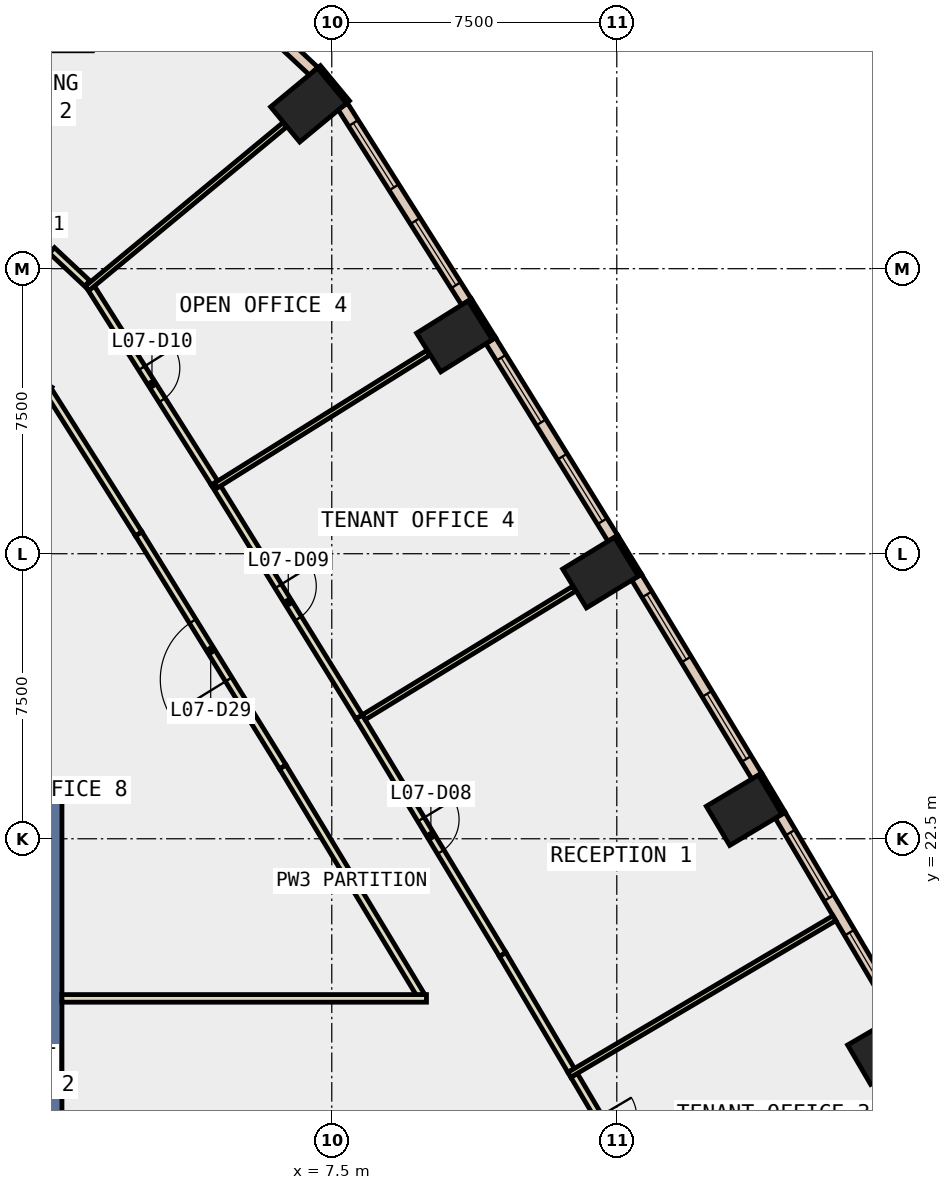
"""IFC4 building model, lengths in metres.
Left out: names, types, materials, properties, quantities, classifications, styles, units other than length and angle.
Written with IfcOpenShell. Run it as: python <this file> out.ifc"""

import sys

from ifc_helpers import new_model, si_unit, direction, frame, frame_2d, origin, origin_2d, place, context, subcontext, project, spatial, rectangle, extrude, element, fill, save


model = new_model("IFC4")
c1 = context("Model", 3, precision=1e-05, world=origin(), true_north=direction((0.0, 1.0)))
c2 = subcontext(c1, "Body", "Model", "MODEL_VIEW")
j1 = project(units=[si_unit("LENGTHUNIT", "METRE"), si_unit("PLANEANGLEUNIT", "RADIAN")], contexts=[c1])
p1 = place(None, origin())
s1 = spatial("IfcSite", under=j1, at=p1, CompositionType="ELEMENT")
p2 = place(p1, origin())
s2 = spatial("IfcBuilding", under=s1, at=p2, CompositionType="ELEMENT")
p3 = place(p2, frame((0.0, 0.0, 39.2)))
s3 = spatial("IfcBuildingStorey", under=s2, at=p3, CompositionType="ELEMENT", Elevation=39.2)
for number, where, z_axis, x_axis in (
    (1, (22.068, 16.959, -0.4), (0.0, 0.0, 1.0), (-0.504, 0.864, 0.0)),
    (2, (18.35, 23.25, -0.4), (0.0, 0.0, 1.0), (-0.513, 0.858, 0.0)),
    (3, (14.571, 29.504, -0.4), (0.0, 0.0, 1.0), (-0.522, 0.853, 0.0)),
    (4, (10.729, 35.719, -0.4), (0.0, 0.0, 1.0), (-0.53, 0.848, 0.0)),
    (5, (6.89, 41.806, -0.4), (0.0, 0.0, 1.0), (-0.638, 0.77, 0.0)),
):
    element("IfcColumn", number, at=place(p3, frame(where, z_axis=z_axis, x_axis=x_axis)), inside=s3, PredefinedType="COLUMN", context=c2, shape_type="SweptSolid", body=[
        extrude(rectangle(XDim=1.2, YDim=1.6, at=origin_2d()), origin(), (0.0, 0.0, 1.0), 4.2),
    ])
p4 = place(p3, frame((0.0, 14.5, -0.4), z_axis=(0.0, 0.0, 1.0), x_axis=(0.0, 1.0, 0.0)))
e6 = element("IfcWall", 6, at=p4, inside=s3, PredefinedType="SHEAR", context=c2, shape_type="SweptSolid", body=[
    extrude(rectangle(XDim=9.0, YDim=0.8, at=frame_2d((4.5, 0.0))), origin(), (0.0, 0.0, 1.0), 4.2),
])
for number, where, z_axis, x_axis in (
    (7, (19.388, 23.171, 0.0), (0.0, 0.0, 1.0), (-0.513, 0.858, 0.0)),
    (8, (15.609, 29.435, 0.0), (0.0, 0.0, 1.0), (-0.522, 0.853, 0.0)),
):
    element("IfcWall", number, at=place(p3, frame(where, z_axis=z_axis, x_axis=x_axis)), inside=s3, PredefinedType="STANDARD", context=c2, shape_type="SweptSolid", body=[
        extrude(rectangle(XDim=1.2, YDim=0.1, at=frame_2d((0.6, 0.0))), origin(), (0.0, 0.0, 1.0), 3.8),
    ])
for number, where, z_axis, x_axis in (
    (9, (11.768, 35.661, 0.0), (0.0, 0.0, 1.0), (-0.53, 0.848, 0.0)),
    (10, (7.927, 41.886, 0.0), (0.0, 0.0, 1.0), (-0.638, 0.77, 0.0)),
):
    element("IfcWall", number, at=place(p3, frame(where, z_axis=z_axis, x_axis=x_axis)), inside=s3, PredefinedType="STANDARD", context=c2, shape_type="SweptSolid", body=[
        extrude(rectangle(XDim=1.199, YDim=0.1, at=frame_2d((0.6, 0.0))), origin(), (0.0, 0.0, 1.0), 3.8),
    ])
p5 = place(p3, frame((22.411, 17.853, 0.0), z_axis=(0.0, 0.0, 1.0), x_axis=(-0.508749483145, 0.860914608658, 0.0)))
e11 = element("IfcWall", 11, at=p5, inside=s3, PredefinedType="STANDARD", context=c2, shape_type="SweptSolid", body=[
    extrude(rectangle(XDim=6.117, YDim=0.3, at=frame_2d((3.058, 0.0))), origin(), (0.0, 0.0, 1.0), 3.8),
])
p6 = place(p5, frame((0.529, 0.0, 0.9)))
e12 = element("IfcOpeningElement", 12, at=p6, cuts=e11, PredefinedType="OPENING", context=c2, shape_type="SweptSolid", body=[
    extrude(rectangle(XDim=2.0, YDim=2.6, at=frame_2d((1.0, 1.3))), frame((0.0, 0.16, 0.0), z_axis=(0.0, -1.0, 0.0), x_axis=(1.0, 0.0, 0.0)), (0.0, 0.0, 1.0), 0.32),
])
p7 = place(p5, frame((3.588, 0.0, 0.9)))
e13 = element("IfcOpeningElement", 13, at=p7, cuts=e11, PredefinedType="OPENING", context=c2, shape_type="SweptSolid", body=[
    extrude(rectangle(XDim=2.0, YDim=2.6, at=frame_2d((1.0, 1.3))), frame((0.0, 0.16, 0.0), z_axis=(0.0, -1.0, 0.0), x_axis=(1.0, 0.0, 0.0)), (0.0, 0.0, 1.0), 0.32),
])
p8 = place(p3, frame((18.684, 24.148, 0.0), z_axis=(0.0, 0.0, 1.0), x_axis=(-0.517211293816, 0.855857743757, 0.0)))
e14 = element("IfcWall", 14, at=p8, inside=s3, PredefinedType="STANDARD", context=c2, shape_type="SweptSolid", body=[
    extrude(rectangle(XDim=6.116, YDim=0.3, at=frame_2d((3.058, 0.0))), origin(), (0.0, 0.0, 1.0), 3.8),
])
p9 = place(p8, frame((0.529, 0.0, 0.9)))
e15 = element("IfcOpeningElement", 15, at=p9, cuts=e14, PredefinedType="OPENING", context=c2, shape_type="SweptSolid", body=[
    extrude(rectangle(XDim=2.0, YDim=2.6, at=frame_2d((1.0, 1.3))), frame((0.0, 0.16, 0.0), z_axis=(0.0, -1.0, 0.0), x_axis=(1.0, 0.0, 0.0)), (0.0, 0.0, 1.0), 0.32),
])
p10 = place(p8, frame((3.587, 0.0, 0.9)))
e16 = element("IfcOpeningElement", 16, at=p10, cuts=e14, PredefinedType="OPENING", context=c2, shape_type="SweptSolid", body=[
    extrude(rectangle(XDim=2.0, YDim=2.6, at=frame_2d((1.0, 1.3))), frame((0.0, 0.16, 0.0), z_axis=(0.0, -1.0, 0.0), x_axis=(1.0, 0.0, 0.0)), (0.0, 0.0, 1.0), 0.32),
])
p11 = place(p3, frame((14.896, 30.404, 0.0), z_axis=(0.0, 0.0, 1.0), x_axis=(-0.525791118496, 0.850613719447, 0.0)))
e17 = element("IfcWall", 17, at=p11, inside=s3, PredefinedType="STANDARD", context=c2, shape_type="SweptSolid", body=[
    extrude(rectangle(XDim=6.117, YDim=0.3, at=frame_2d((3.058, 0.0))), origin(), (0.0, 0.0, 1.0), 3.8),
])
p12 = place(p11, frame((0.529, 0.0, 0.9)))
e18 = element("IfcOpeningElement", 18, at=p12, cuts=e17, PredefinedType="OPENING", context=c2, shape_type="SweptSolid", body=[
    extrude(rectangle(XDim=2.0, YDim=2.6, at=frame_2d((1.0, 1.3))), frame((0.0, 0.16, 0.0), z_axis=(0.0, -1.0, 0.0), x_axis=(1.0, 0.0, 0.0)), (0.0, 0.0, 1.0), 0.32),
])
p13 = place(p11, frame((3.588, 0.0, 0.9)))
e19 = element("IfcOpeningElement", 19, at=p13, cuts=e17, PredefinedType="OPENING", context=c2, shape_type="SweptSolid", body=[
    extrude(rectangle(XDim=2.0, YDim=2.6, at=frame_2d((1.0, 1.3))), frame((0.0, 0.16, 0.0), z_axis=(0.0, -1.0, 0.0), x_axis=(1.0, 0.0, 0.0)), (0.0, 0.0, 1.0), 0.32),
])
p14 = place(p3, frame((11.045, 36.623, 0.0), z_axis=(0.0, 0.0, 1.0), x_axis=(-0.53437888117, 0.845245059944, 0.0)))
e20 = element("IfcWall", 20, at=p14, inside=s3, PredefinedType="STANDARD", context=c2, shape_type="SweptSolid", body=[
    extrude(rectangle(XDim=6.093, YDim=0.3, at=frame_2d((3.046, 0.0))), origin(), (0.0, 0.0, 1.0), 3.8),
])
p15 = place(p14, frame((0.523, 0.0, 0.9)))
e21 = element("IfcOpeningElement", 21, at=p15, cuts=e20, PredefinedType="OPENING", context=c2, shape_type="SweptSolid", body=[
    extrude(rectangle(XDim=2.0, YDim=2.6, at=frame_2d((1.0, 1.3))), frame((0.0, 0.16, 0.0), z_axis=(0.0, -1.0, 0.0), x_axis=(1.0, 0.0, 0.0)), (0.0, 0.0, 1.0), 0.32),
])
p16 = place(p14, frame((3.57, 0.0, 0.9)))
e22 = element("IfcOpeningElement", 22, at=p16, cuts=e20, PredefinedType="OPENING", context=c2, shape_type="SweptSolid", body=[
    extrude(rectangle(XDim=2.0, YDim=2.6, at=frame_2d((1.0, 1.3))), frame((0.0, 0.16, 0.0), z_axis=(0.0, -1.0, 0.0), x_axis=(1.0, 0.0, 0.0)), (0.0, 0.0, 1.0), 0.32),
])
p17 = place(p3, frame((7.025, 42.696, 0.0), z_axis=(0.0, 0.0, 1.0), x_axis=(-0.730600984463, 0.682804658377, 0.0)))
e23 = element("IfcWall", 23, at=p17, inside=s3, PredefinedType="STANDARD", context=c2, shape_type="SweptSolid", body=[
    extrude(rectangle(XDim=3.182, YDim=0.3, at=frame_2d((1.591, 0.0))), origin(), (0.0, 0.0, 1.0), 3.8),
])
p18 = place(p17, frame((0.891, 0.0, 0.9)))
e24 = element("IfcOpeningElement", 24, at=p18, cuts=e23, PredefinedType="OPENING", context=c2, shape_type="SweptSolid", body=[
    extrude(rectangle(XDim=1.4, YDim=2.6, at=frame_2d((0.7, 1.3))), frame((0.0, 0.16, 0.0), z_axis=(0.0, -1.0, 0.0), x_axis=(1.0, 0.0, 0.0)), (0.0, 0.0, 1.0), 0.32),
])
p19 = place(p3, frame((9.84, 18.386, 0.0), z_axis=(0.0, 0.0, 1.0), x_axis=(-0.51736780002, 0.85576314451, 0.0)))
e25 = element("IfcWall", 25, at=p19, inside=s3, PredefinedType="PARTITIONING", context=c2, shape_type="SweptSolid", body=[
    extrude(rectangle(XDim=7.018, YDim=0.2, at=frame_2d((3.509, 0.0))), origin(), (0.0, 0.0, 1.0), 3.8),
])
p20 = place(p3, frame((6.209, 24.392, 0.0), z_axis=(0.0, 0.0, 1.0), x_axis=(-0.525766851327, 0.850628719269, 0.0)))
e26 = element("IfcWall", 26, at=p20, inside=s3, PredefinedType="PARTITIONING", context=c2, shape_type="SweptSolid", body=[
    extrude(rectangle(XDim=7.208, YDim=0.2, at=frame_2d((3.604, 0.0))), origin(), (0.0, 0.0, 1.0), 3.8),
])
p21 = place(p20, frame((2.704, 0.0, 0.0)))
e27 = element("IfcOpeningElement", 27, at=p21, cuts=e26, PredefinedType="OPENING", context=c2, shape_type="SweptSolid", body=[
    extrude(rectangle(XDim=1.8, YDim=2.1, at=frame_2d((0.9, 1.05))), frame((0.0, 0.11, 0.0), z_axis=(0.0, -1.0, 0.0), x_axis=(1.0, 0.0, 0.0)), (0.0, 0.0, 1.0), 0.22),
])
p22 = place(p3, frame((2.419, 30.524, 0.0), z_axis=(0.0, 0.0, 1.0), x_axis=(-0.534393348019, 0.845235913573, 0.0)))
e28 = element("IfcWall", 28, at=p22, inside=s3, PredefinedType="PARTITIONING", context=c2, shape_type="SweptSolid", body=[
    extrude(rectangle(XDim=4.427, YDim=0.2, at=frame_2d((2.214, 0.0))), origin(), (0.0, 0.0, 1.0), 3.8),
])
p23 = place(p3, frame((0.053, 34.435, 0.0), z_axis=(0.0, 0.0, 1.0), x_axis=(-0.534260976666, -0.845319589748, 0.0)))
e29 = element("IfcWall", 29, at=p23, inside=s3, PredefinedType="PARTITIONING", context=c2, shape_type="SweptSolid", body=[
    extrude(rectangle(XDim=4.627, YDim=0.2, at=frame_2d((2.313, 0.0))), origin(), (0.0, 0.0, 1.0), 3.8),
])
p24 = place(p3, frame((13.877, 16.275, 0.0), z_axis=(0.0, 0.0, 1.0), x_axis=(0.508613166028, -0.860995149431, 0.0)))
e30 = element("IfcWall", 30, at=p24, inside=s3, PredefinedType="PARTITIONING", context=c2, shape_type="SweptSolid", body=[
    extrude(rectangle(XDim=3.541, YDim=0.2, at=frame_2d((1.771, 0.0))), origin(), (0.0, 0.0, 1.0), 3.8),
])
p25 = place(p24, frame((1.271, 0.0, 0.0)))
e31 = element("IfcOpeningElement", 31, at=p25, cuts=e30, PredefinedType="OPENING", context=c2, shape_type="SweptSolid", body=[
    extrude(rectangle(XDim=1.0, YDim=2.1, at=frame_2d((0.5, 1.05))), frame((0.0, 0.11, 0.0), z_axis=(0.0, -1.0, 0.0), x_axis=(1.0, 0.0, 0.0)), (0.0, 0.0, 1.0), 0.22),
])
p26 = place(p3, frame((8.218, 25.708, 0.0), z_axis=(0.0, 0.0, 1.0), x_axis=(0.517278800461, -0.855816944559, 0.0)))
e32 = element("IfcWall", 32, at=p26, inside=s3, PredefinedType="PARTITIONING", context=c2, shape_type="SweptSolid", body=[
    extrude(rectangle(XDim=7.308, YDim=0.2, at=frame_2d((3.654, 0.0))), origin(), (0.0, 0.0, 1.0), 3.8),
])
p27 = place(p26, frame((3.154, 0.0, 0.0)))
e33 = element("IfcOpeningElement", 33, at=p27, cuts=e32, PredefinedType="OPENING", context=c2, shape_type="SweptSolid", body=[
    extrude(rectangle(XDim=1.0, YDim=2.1, at=frame_2d((0.5, 1.05))), frame((0.0, 0.11, 0.0), z_axis=(0.0, -1.0, 0.0), x_axis=(1.0, 0.0, 0.0)), (0.0, 0.0, 1.0), 0.22),
])
p28 = place(p3, frame((11.998, 19.454, 0.0), z_axis=(0.0, 0.0, 1.0), x_axis=(0.508666621784, -0.860963569428, 0.0)))
e34 = element("IfcWall", 34, at=p28, inside=s3, PredefinedType="PARTITIONING", context=c2, shape_type="SweptSolid", body=[
    extrude(rectangle(XDim=3.542, YDim=0.2, at=frame_2d((1.771, 0.0))), origin(), (0.0, 0.0, 1.0), 3.8),
])
p29 = place(p3, frame((4.414, 31.86, 0.0), z_axis=(0.0, 0.0, 1.0), x_axis=(0.525906013367, -0.850542688584, 0.0)))
e35 = element("IfcWall", 35, at=p29, inside=s3, PredefinedType="PARTITIONING", context=c2, shape_type="SweptSolid", body=[
    extrude(rectangle(XDim=7.233, YDim=0.2, at=frame_2d((3.617, 0.0))), origin(), (0.0, 0.0, 1.0), 3.8),
])
p30 = place(p29, frame((3.191, 0.0, 0.0)))
e36 = element("IfcOpeningElement", 36, at=p30, cuts=e35, PredefinedType="OPENING", context=c2, shape_type="SweptSolid", body=[
    extrude(rectangle(XDim=1.0, YDim=2.1, at=frame_2d((0.5, 1.05))), frame((0.0, 0.11, 0.0), z_axis=(0.0, -1.0, 0.0), x_axis=(1.0, 0.0, 0.0)), (0.0, 0.0, 1.0), 0.22),
])
p31 = place(p3, frame((1.123, 37.065, 0.0), z_axis=(0.0, 0.0, 1.0), x_axis=(0.534428477307, -0.845213702352, 0.0)))
e37 = element("IfcWall", 37, at=p31, inside=s3, PredefinedType="PARTITIONING", context=c2, shape_type="SweptSolid", body=[
    extrude(rectangle(XDim=6.158, YDim=0.2, at=frame_2d((3.079, 0.0))), origin(), (0.0, 0.0, 1.0), 3.8),
])
p32 = place(p31, frame((2.579, 0.0, 0.0)))
e38 = element("IfcOpeningElement", 38, at=p32, cuts=e37, PredefinedType="OPENING", context=c2, shape_type="SweptSolid", body=[
    extrude(rectangle(XDim=1.0, YDim=2.1, at=frame_2d((0.5, 1.05))), frame((0.0, 0.11, 0.0), z_axis=(0.0, -1.0, 0.0), x_axis=(1.0, 0.0, 0.0)), (0.0, 0.0, 1.0), 0.22),
])
p33 = place(p3, frame((0.135, 37.981, 0.0), z_axis=(0.0, 0.0, 1.0), x_axis=(0.730320833825, -0.683104296342, 0.0)))
e39 = element("IfcWall", 39, at=p33, inside=s3, PredefinedType="PARTITIONING", context=c2, shape_type="SweptSolid", body=[
    extrude(rectangle(XDim=1.272, YDim=0.2, at=frame_2d((0.636, 0.0))), origin(), (0.0, 0.0, 1.0), 3.8),
])
p34 = place(p3, frame((13.752, 16.289, 0.0), z_axis=(0.0, 0.0, 1.0), x_axis=(0.86093852802, 0.508709004216, 0.0)))
e40 = element("IfcWall", 40, at=p34, inside=s3, PredefinedType="PARTITIONING", context=c2, shape_type="SweptSolid", body=[
    extrude(rectangle(XDim=8.101, YDim=0.15, at=frame_2d((4.05, 0.0))), origin(), (0.0, 0.0, 1.0), 3.8),
])
p35 = place(p3, frame((8.342, 25.696, 0.0), z_axis=(0.0, 0.0, 1.0), x_axis=(0.853252966465, 0.521497243731, 0.0)))
e41 = element("IfcWall", 41, at=p35, inside=s3, PredefinedType="PARTITIONING", context=c2, shape_type="SweptSolid", body=[
    extrude(rectangle(XDim=6.481, YDim=0.15, at=frame_2d((3.241, 0.0))), origin(), (0.0, 0.0, 1.0), 3.8),
])
p36 = place(p3, frame((4.454, 31.796, 0.0), z_axis=(0.0, 0.0, 1.0), x_axis=(0.847954529694, 0.530068972467, 0.0)))
e42 = element("IfcWall", 42, at=p36, inside=s3, PredefinedType="PARTITIONING", context=c2, shape_type="SweptSolid", body=[
    extrude(rectangle(XDim=6.58, YDim=0.15, at=frame_2d((3.29, 0.0))), origin(), (0.0, 0.0, 1.0), 3.8),
])
p37 = place(p3, frame((1.06, 36.98, 0.0), z_axis=(0.0, 0.0, 1.0), x_axis=(0.770307911054, 0.6376721118, 0.0)))
e43 = element("IfcWall", 43, at=p37, inside=s3, PredefinedType="PARTITIONING", context=c2, shape_type="SweptSolid", body=[
    extrude(rectangle(XDim=6.748, YDim=0.15, at=frame_2d((3.374, 0.0))), origin(), (0.0, 0.0, 1.0), 3.8),
])
p38 = place(p3, frame((0.4, 18.3, 0.0), z_axis=(0.0, 0.0, 1.0), x_axis=(1.0, 0.0, 0.0)))
e44 = element("IfcWall", 44, at=p38, inside=s3, PredefinedType="PARTITIONING", context=c2, shape_type="SweptSolid", body=[
    extrude(rectangle(XDim=9.592, YDim=0.2, at=frame_2d((4.796, 0.0))), origin(), (0.0, 0.0, 1.0), 3.8),
])
p39 = place(p6, origin())
e45 = element("IfcWindow", 45, at=p39, inside=s3, PartitioningType="SINGLE_PANEL", PredefinedType="WINDOW", context=c2, shape_type="SweptSolid", body=[
    extrude(rectangle(XDim=2.0, YDim=2.6, at=frame_2d((1.0, 1.3))), frame((0.0, 0.03, 0.0), z_axis=(0.0, -1.0, 0.0), x_axis=(1.0, 0.0, 0.0)), (0.0, 0.0, 1.0), 0.06),
])
fill(e12, e45)
p40 = place(p7, origin())
e46 = element("IfcWindow", 46, at=p40, inside=s3, PartitioningType="SINGLE_PANEL", PredefinedType="WINDOW", context=c2, shape_type="SweptSolid", body=[
    extrude(rectangle(XDim=2.0, YDim=2.6, at=frame_2d((1.0, 1.3))), frame((0.0, 0.03, 0.0), z_axis=(0.0, -1.0, 0.0), x_axis=(1.0, 0.0, 0.0)), (0.0, 0.0, 1.0), 0.06),
])
fill(e13, e46)
p41 = place(p9, origin())
e47 = element("IfcWindow", 47, at=p41, inside=s3, PartitioningType="SINGLE_PANEL", PredefinedType="WINDOW", context=c2, shape_type="SweptSolid", body=[
    extrude(rectangle(XDim=2.0, YDim=2.6, at=frame_2d((1.0, 1.3))), frame((0.0, 0.03, 0.0), z_axis=(0.0, -1.0, 0.0), x_axis=(1.0, 0.0, 0.0)), (0.0, 0.0, 1.0), 0.06),
])
fill(e15, e47)
p42 = place(p10, origin())
e48 = element("IfcWindow", 48, at=p42, inside=s3, PartitioningType="SINGLE_PANEL", PredefinedType="WINDOW", context=c2, shape_type="SweptSolid", body=[
    extrude(rectangle(XDim=2.0, YDim=2.6, at=frame_2d((1.0, 1.3))), frame((0.0, 0.03, 0.0), z_axis=(0.0, -1.0, 0.0), x_axis=(1.0, 0.0, 0.0)), (0.0, 0.0, 1.0), 0.06),
])
fill(e16, e48)
p43 = place(p12, origin())
e49 = element("IfcWindow", 49, at=p43, inside=s3, PartitioningType="SINGLE_PANEL", PredefinedType="WINDOW", context=c2, shape_type="SweptSolid", body=[
    extrude(rectangle(XDim=2.0, YDim=2.6, at=frame_2d((1.0, 1.3))), frame((0.0, 0.03, 0.0), z_axis=(0.0, -1.0, 0.0), x_axis=(1.0, 0.0, 0.0)), (0.0, 0.0, 1.0), 0.06),
])
fill(e18, e49)
p44 = place(p13, origin())
e50 = element("IfcWindow", 50, at=p44, inside=s3, PartitioningType="SINGLE_PANEL", PredefinedType="WINDOW", context=c2, shape_type="SweptSolid", body=[
    extrude(rectangle(XDim=2.0, YDim=2.6, at=frame_2d((1.0, 1.3))), frame((0.0, 0.03, 0.0), z_axis=(0.0, -1.0, 0.0), x_axis=(1.0, 0.0, 0.0)), (0.0, 0.0, 1.0), 0.06),
])
fill(e19, e50)
p45 = place(p15, origin())
e51 = element("IfcWindow", 51, at=p45, inside=s3, PartitioningType="SINGLE_PANEL", PredefinedType="WINDOW", context=c2, shape_type="SweptSolid", body=[
    extrude(rectangle(XDim=2.0, YDim=2.6, at=frame_2d((1.0, 1.3))), frame((0.0, 0.03, 0.0), z_axis=(0.0, -1.0, 0.0), x_axis=(1.0, 0.0, 0.0)), (0.0, 0.0, 1.0), 0.06),
])
fill(e21, e51)
p46 = place(p16, origin())
e52 = element("IfcWindow", 52, at=p46, inside=s3, PartitioningType="SINGLE_PANEL", PredefinedType="WINDOW", context=c2, shape_type="SweptSolid", body=[
    extrude(rectangle(XDim=2.0, YDim=2.6, at=frame_2d((1.0, 1.3))), frame((0.0, 0.03, 0.0), z_axis=(0.0, -1.0, 0.0), x_axis=(1.0, 0.0, 0.0)), (0.0, 0.0, 1.0), 0.06),
])
fill(e22, e52)
p47 = place(p27, origin())
e53 = element("IfcDoor", 53, at=p47, inside=s3, OperationType="SINGLE_SWING_LEFT", PredefinedType="DOOR", context=c2, shape_type="SweptSolid", body=[
    extrude(rectangle(XDim=1.0, YDim=2.1, at=frame_2d((0.5, 1.05))), frame((0.0, 0.025, 0.0), z_axis=(0.0, -1.0, 0.0), x_axis=(1.0, 0.0, 0.0)), (0.0, 0.0, 1.0), 0.05),
])
fill(e33, e53)
p48 = place(p30, origin())
e54 = element("IfcDoor", 54, at=p48, inside=s3, OperationType="SINGLE_SWING_LEFT", PredefinedType="DOOR", context=c2, shape_type="SweptSolid", body=[
    extrude(rectangle(XDim=1.0, YDim=2.1, at=frame_2d((0.5, 1.05))), frame((0.0, 0.025, 0.0), z_axis=(0.0, -1.0, 0.0), x_axis=(1.0, 0.0, 0.0)), (0.0, 0.0, 1.0), 0.05),
])
fill(e36, e54)
p49 = place(p32, origin())
e55 = element("IfcDoor", 55, at=p49, inside=s3, OperationType="SINGLE_SWING_LEFT", PredefinedType="DOOR", context=c2, shape_type="SweptSolid", body=[
    extrude(rectangle(XDim=1.0, YDim=2.1, at=frame_2d((0.5, 1.05))), frame((0.0, 0.025, 0.0), z_axis=(0.0, -1.0, 0.0), x_axis=(1.0, 0.0, 0.0)), (0.0, 0.0, 1.0), 0.05),
])
fill(e38, e55)
p50 = place(p21, origin())
e56 = element("IfcDoor", 56, at=p50, inside=s3, OperationType="DOUBLE_DOOR_SINGLE_SWING", PredefinedType="DOOR", context=c2, shape_type="SweptSolid", body=[
    extrude(rectangle(XDim=1.8, YDim=2.1, at=frame_2d((0.9, 1.05))), frame((0.0, 0.025, 0.0), z_axis=(0.0, -1.0, 0.0), x_axis=(1.0, 0.0, 0.0)), (0.0, 0.0, 1.0), 0.05),
])
fill(e27, e56)
save(model, sys.argv[1])
